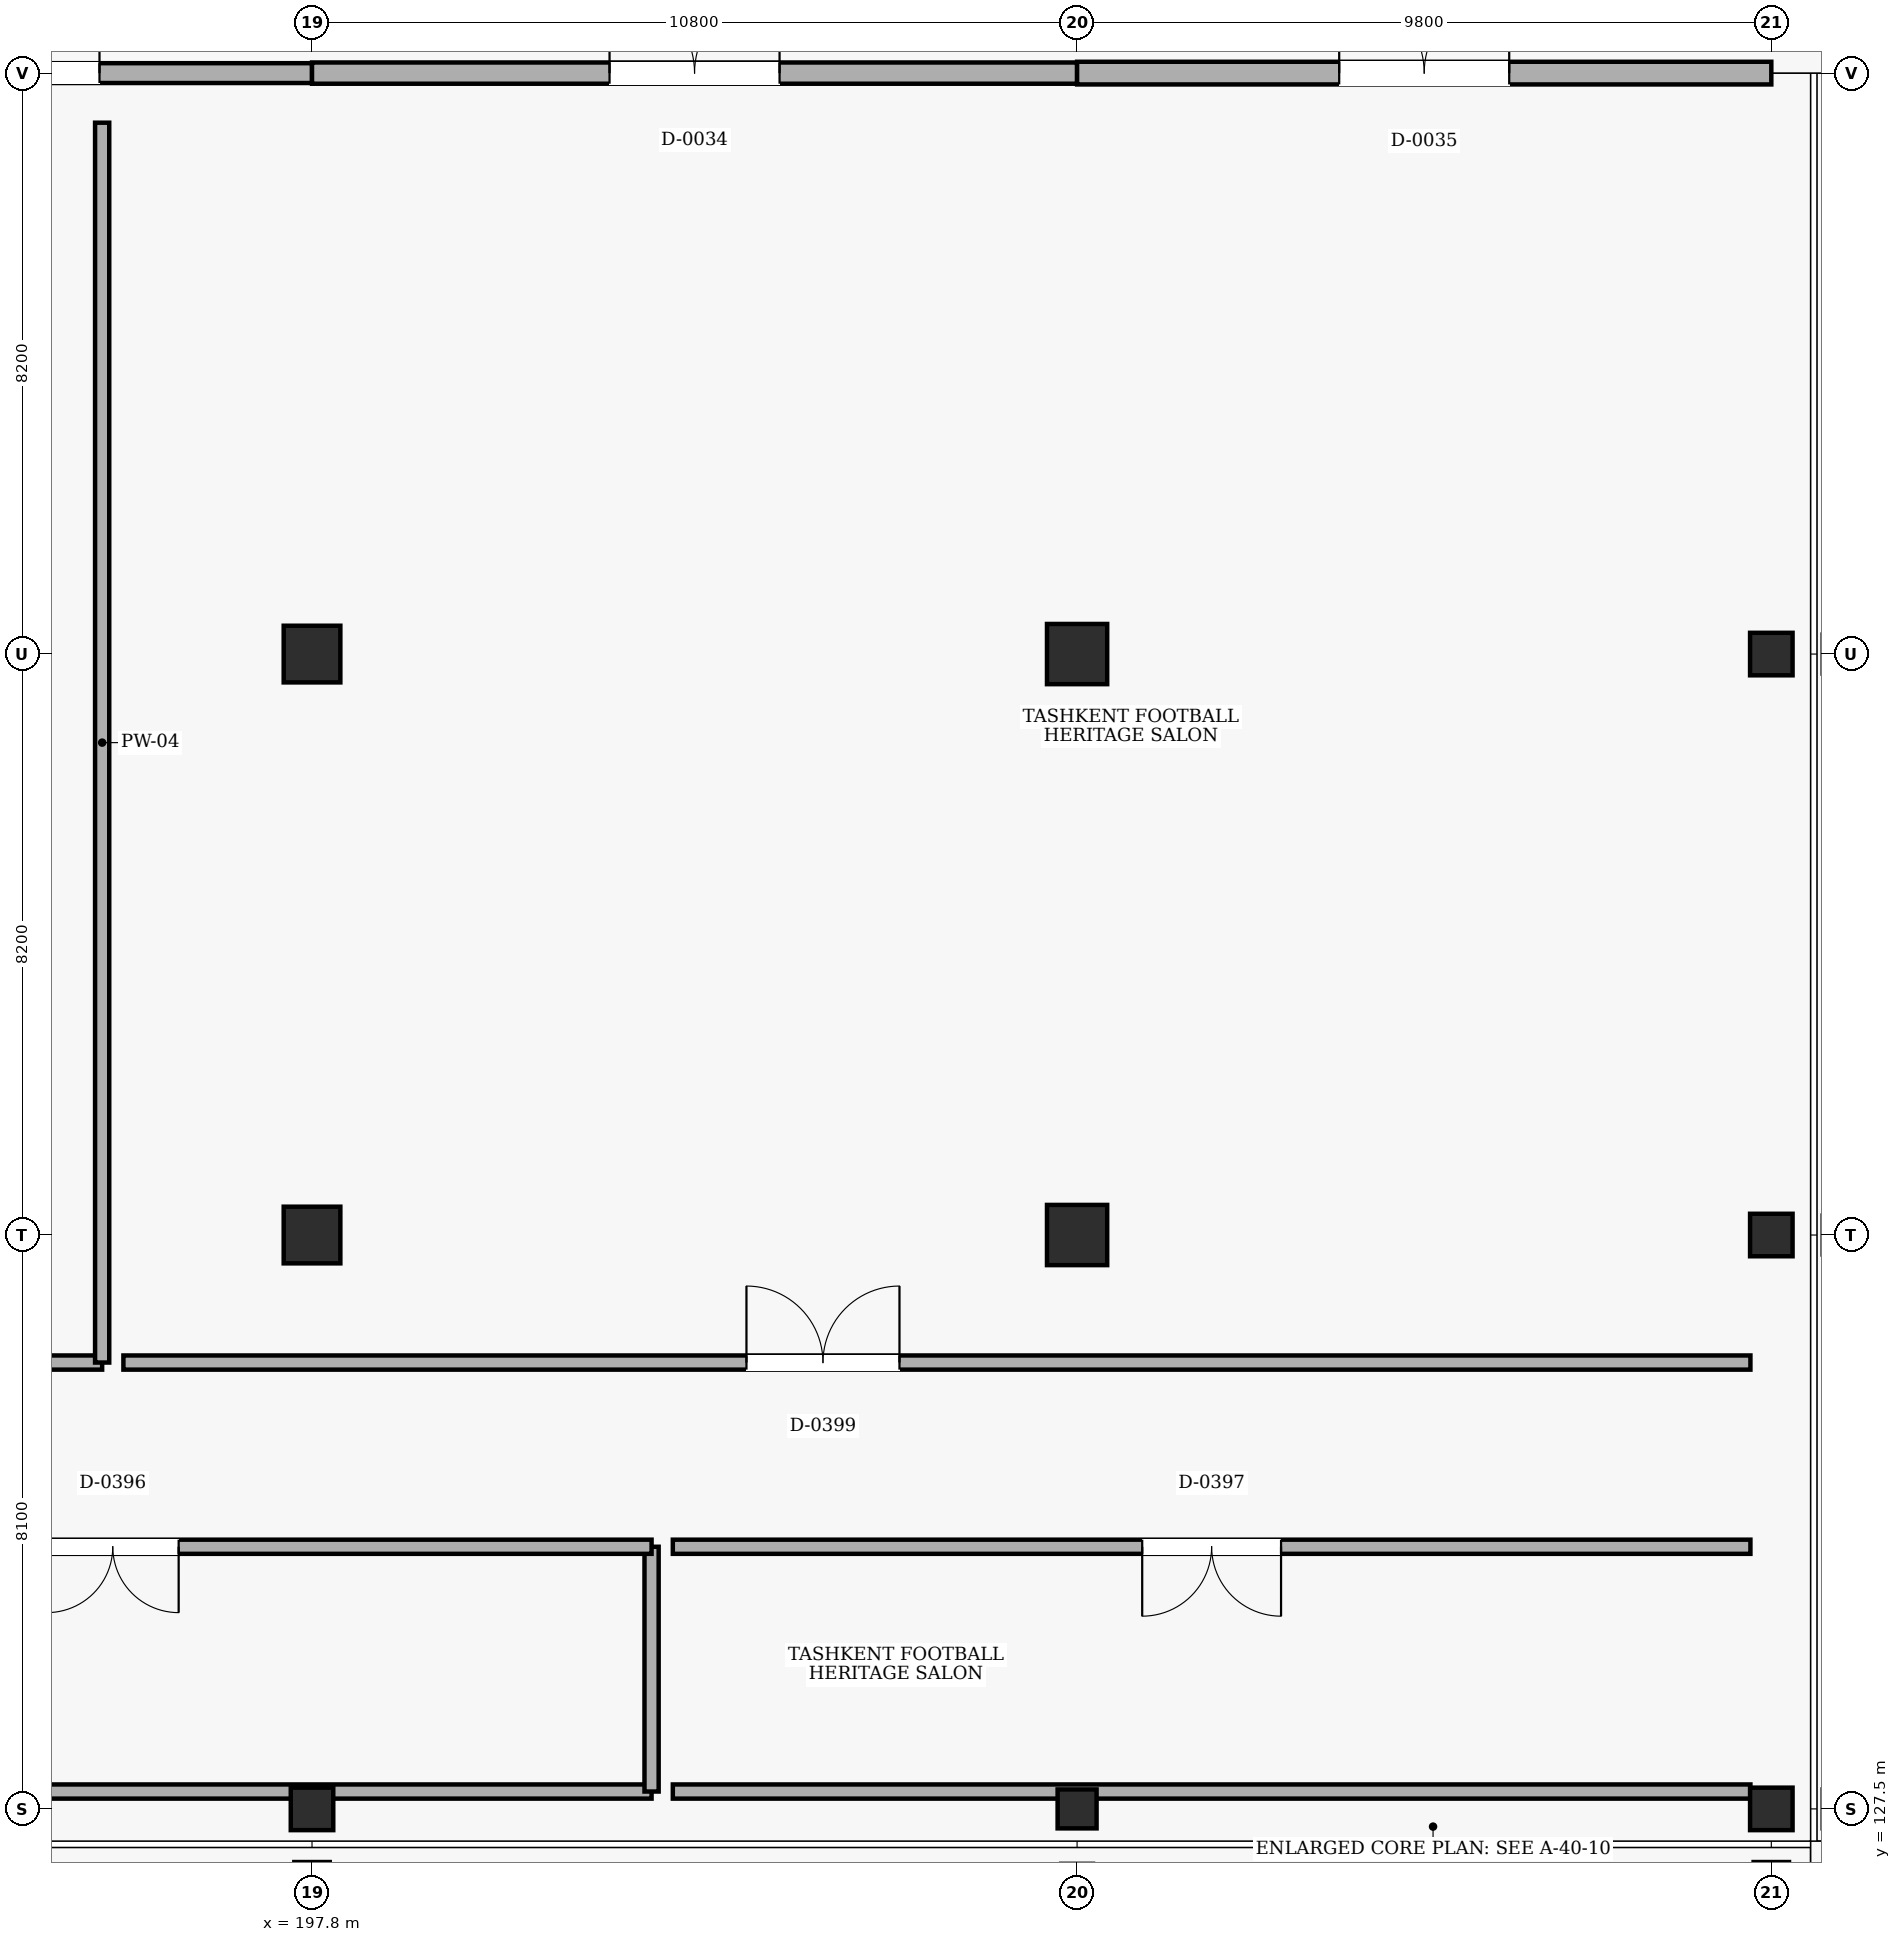
"""IFC4 building model, lengths in metres.
Left out: names, types, materials, properties, quantities, classifications, styles, units other than length and angle.
Written with IfcOpenShell. Run it as: python <this file> out.ifc"""

import sys

from ifc_helpers import new_model, si_unit, direction, frame, frame_2d, origin, origin_2d, place, context, subcontext, project, spatial, rectangle, extrude, element, fill, save


model = new_model("IFC4")
c1 = context("Model", 3, precision=1e-05, world=origin(), true_north=direction((0.0, 1.0)))
c2 = subcontext(c1, "Body", "Model", "MODEL_VIEW")
j1 = project(units=[si_unit("LENGTHUNIT", "METRE"), si_unit("PLANEANGLEUNIT", "RADIAN")], contexts=[c1])
p1 = place(None, origin())
s1 = spatial("IfcSite", under=j1, at=p1, CompositionType="ELEMENT")
p2 = place(p1, origin())
s2 = spatial("IfcBuilding", under=s1, at=p2, CompositionType="ELEMENT")
p3 = place(p2, origin())
s3 = spatial("IfcBuildingStorey", under=s2, at=p3, CompositionType="ELEMENT", Elevation=0.0)
p4 = place(p3, frame((197.8, 126.5, 0.0), z_axis=(0.0, 0.0, 1.0), x_axis=(1.0, 0.0, 0.0)))
e1 = element("IfcColumn", 1, at=p4, inside=s3, PredefinedType="COLUMN", context=c2, shape_type="SweptSolid", body=[
    extrude(rectangle(XDim=0.5, YDim=0.5, at=origin_2d()), origin(), (0.0, 0.0, 1.0), 5.4),
])
p5 = place(p3, frame((197.8, 127.5, 0.0), z_axis=(0.0, 0.0, 1.0), x_axis=(1.0, 0.0, 0.0)))
e2 = element("IfcColumn", 2, at=p5, inside=s3, PredefinedType="COLUMN", context=c2, shape_type="SweptSolid", body=[
    extrude(rectangle(XDim=0.6, YDim=0.6, at=origin_2d()), origin(), (0.0, 0.0, 1.0), 5.4),
])
for number, where, z_axis, x_axis in (
    (3, (197.8, 135.6, 0.0), (0.0, 0.0, 1.0), (1.0, 0.0, 0.0)),
    (4, (197.8, 143.8, 0.0), (0.0, 0.0, 1.0), (1.0, 0.0, 0.0)),
):
    element("IfcColumn", number, at=place(p3, frame(where, z_axis=z_axis, x_axis=x_axis)), inside=s3, PredefinedType="COLUMN", context=c2, shape_type="SweptSolid", body=[
        extrude(rectangle(XDim=0.8, YDim=0.8, at=origin_2d()), origin(), (0.0, 0.0, 1.0), 5.4),
    ])
p6 = place(p3, frame((208.6, 127.5, 0.0), z_axis=(0.0, 0.0, 1.0), x_axis=(1.0, 0.0, 0.0)))
e5 = element("IfcColumn", 5, at=p6, inside=s3, PredefinedType="COLUMN", context=c2, shape_type="SweptSolid", body=[
    extrude(rectangle(XDim=0.55, YDim=0.55, at=origin_2d()), origin(), (0.0, 0.0, 1.0), 5.4),
])
for number, where, z_axis, x_axis in (
    (6, (208.6, 135.6, 0.0), (0.0, 0.0, 1.0), (1.0, 0.0, 0.0)),
    (7, (208.6, 143.8, 0.0), (0.0, 0.0, 1.0), (1.0, 0.0, 0.0)),
):
    element("IfcColumn", number, at=place(p3, frame(where, z_axis=z_axis, x_axis=x_axis)), inside=s3, PredefinedType="COLUMN", context=c2, shape_type="SweptSolid", body=[
        extrude(rectangle(XDim=0.85, YDim=0.85, at=origin_2d()), origin(), (0.0, 0.0, 1.0), 5.4),
    ])
p7 = place(p3, frame((218.4, 126.5, 0.0), z_axis=(0.0, 0.0, 1.0), x_axis=(1.0, 0.0, 0.0)))
e8 = element("IfcColumn", 8, at=p7, inside=s3, PredefinedType="COLUMN", context=c2, shape_type="SweptSolid", body=[
    extrude(rectangle(XDim=0.5, YDim=0.5, at=origin_2d()), origin(), (0.0, 0.0, 1.0), 5.4),
])
for number, where, z_axis, x_axis in (
    (9, (218.4, 127.5, 0.0), (0.0, 0.0, 1.0), (1.0, 0.0, 0.0)),
    (10, (218.4, 135.6, 0.0), (0.0, 0.0, 1.0), (1.0, 0.0, 0.0)),
    (11, (218.4, 143.8, 0.0), (0.0, 0.0, 1.0), (1.0, 0.0, 0.0)),
):
    element("IfcColumn", number, at=place(p3, frame(where, z_axis=z_axis, x_axis=x_axis)), inside=s3, PredefinedType="COLUMN", context=c2, shape_type="SweptSolid", body=[
        extrude(rectangle(XDim=0.6, YDim=0.6, at=origin_2d()), origin(), (0.0, 0.0, 1.0), 5.4),
    ])
p8 = place(p3, frame((189.4, 152.0, 0.0), z_axis=(0.0, 0.0, 1.0), x_axis=(1.0, 0.0, 0.0)))
e12 = element("IfcWall", 12, at=p8, inside=s3, PredefinedType="SOLIDWALL", context=c2, shape_type="SweptSolid", body=[
    extrude(rectangle(XDim=8.4, YDim=0.28, at=frame_2d((4.2, 0.0))), origin(), (0.0, 0.0, 1.0), 5.08),
])
p9 = place(p8, frame((3.0, 0.0, 0.0)))
e13 = element("IfcOpeningElement", 13, at=p9, cuts=e12, PredefinedType="OPENING", context=c2, shape_type="SweptSolid", body=[
    extrude(rectangle(XDim=2.4, YDim=2.2, at=frame_2d((1.2, 1.1))), frame((0.0, 0.15, 0.0), z_axis=(0.0, -1.0, 0.0), x_axis=(1.0, 0.0, 0.0)), (0.0, 0.0, 1.0), 0.3),
])
p10 = place(p3, frame((197.8, 152.0, 0.0), z_axis=(0.0, 0.0, 1.0), x_axis=(1.0, 0.0, 0.0)))
e14 = element("IfcWall", 14, at=p10, inside=s3, PredefinedType="SOLIDWALL", context=c2, shape_type="SweptSolid", body=[
    extrude(rectangle(XDim=10.8, YDim=0.3, at=frame_2d((5.4, 0.0))), origin(), (0.0, 0.0, 1.0), 5.08),
])
p11 = place(p10, frame((4.2, 0.0, 0.0)))
e15 = element("IfcOpeningElement", 15, at=p11, cuts=e14, PredefinedType="OPENING", context=c2, shape_type="SweptSolid", body=[
    extrude(rectangle(XDim=2.4, YDim=2.2, at=frame_2d((1.2, 1.1))), frame((0.0, 0.16, 0.0), z_axis=(0.0, -1.0, 0.0), x_axis=(1.0, 0.0, 0.0)), (0.0, 0.0, 1.0), 0.32),
])
p12 = place(p3, frame((208.6, 152.0, 0.0), z_axis=(0.0, 0.0, 1.0), x_axis=(1.0, 0.0, 0.0)))
e16 = element("IfcWall", 16, at=p12, inside=s3, PredefinedType="SOLIDWALL", context=c2, shape_type="SweptSolid", body=[
    extrude(rectangle(XDim=9.8, YDim=0.32, at=frame_2d((4.9, 0.0))), origin(), (0.0, 0.0, 1.0), 5.08),
])
p13 = place(p12, frame((3.7, 0.0, 0.0)))
e17 = element("IfcOpeningElement", 17, at=p13, cuts=e16, PredefinedType="OPENING", context=c2, shape_type="SweptSolid", body=[
    extrude(rectangle(XDim=2.4, YDim=2.2, at=frame_2d((1.2, 1.1))), frame((0.0, 0.17, 0.0), z_axis=(0.0, -1.0, 0.0), x_axis=(1.0, 0.0, 0.0)), (0.0, 0.0, 1.0), 0.34),
])
p14 = place(p3, frame((187.382, 127.745, 0.0), z_axis=(0.0, 0.0, 1.0), x_axis=(1.0, 0.0, 0.0)))
e18 = element("IfcWall", 18, at=p14, inside=s3, PredefinedType="PARTITIONING", context=c2, shape_type="SweptSolid", body=[
    extrude(rectangle(XDim=15.212, YDim=0.2, at=frame_2d((7.606, 0.0))), origin(), (0.0, 0.0, 1.0), 4.26),
])
p15 = place(p3, frame((202.593, 127.745, 0.0), z_axis=(0.0, 0.0, 1.0), x_axis=(0.0, 1.0, 0.0)))
e19 = element("IfcWall", 19, at=p15, inside=s3, PredefinedType="PARTITIONING", context=c2, shape_type="SweptSolid", body=[
    extrude(rectangle(XDim=3.455, YDim=0.2, at=frame_2d((1.728, 0.0))), origin(), (0.0, 0.0, 1.0), 5.08),
])
p16 = place(p3, frame((202.593, 131.2, 0.0), z_axis=(0.0, 0.0, 1.0), x_axis=(-1.0, 0.0, 0.0)))
e20 = element("IfcWall", 20, at=p16, inside=s3, PredefinedType="PARTITIONING", context=c2, shape_type="SweptSolid", body=[
    extrude(rectangle(XDim=15.212, YDim=0.2, at=frame_2d((7.606, 0.0))), origin(), (0.0, 0.0, 1.0), 5.08),
])
p17 = place(p16, frame((6.676, 0.0, 0.0)))
e21 = element("IfcOpeningElement", 21, at=p17, cuts=e20, PredefinedType="OPENING", context=c2, shape_type="SweptSolid", body=[
    extrude(rectangle(XDim=1.86, YDim=2.3, at=frame_2d((0.93, 1.15))), frame((0.0, 0.11, 0.0), z_axis=(0.0, -1.0, 0.0), x_axis=(1.0, 0.0, 0.0)), (0.0, 0.0, 1.0), 0.22),
])
p18 = place(p3, frame((202.893, 127.745, 0.0), z_axis=(0.0, 0.0, 1.0), x_axis=(1.0, 0.0, 0.0)))
e22 = element("IfcWall", 22, at=p18, inside=s3, PredefinedType="PARTITIONING", context=c2, shape_type="SweptSolid", body=[
    extrude(rectangle(XDim=15.212, YDim=0.2, at=frame_2d((7.606, 0.0))), origin(), (0.0, 0.0, 1.0), 4.21),
])
p19 = place(p3, frame((218.105, 131.2, 0.0), z_axis=(0.0, 0.0, 1.0), x_axis=(-1.0, 0.0, 0.0)))
e23 = element("IfcWall", 23, at=p19, inside=s3, PredefinedType="PARTITIONING", context=c2, shape_type="SweptSolid", body=[
    extrude(rectangle(XDim=15.212, YDim=0.2, at=frame_2d((7.606, 0.0))), origin(), (0.0, 0.0, 1.0), 5.08),
])
p20 = place(p19, frame((6.626, 0.0, 0.0)))
e24 = element("IfcOpeningElement", 24, at=p20, cuts=e23, PredefinedType="OPENING", context=c2, shape_type="SweptSolid", body=[
    extrude(rectangle(XDim=1.96, YDim=2.3, at=frame_2d((0.98, 1.15))), frame((0.0, 0.11, 0.0), z_axis=(0.0, -1.0, 0.0), x_axis=(1.0, 0.0, 0.0)), (0.0, 0.0, 1.0), 0.22),
])
p21 = place(p3, frame((188.68, 133.8, 0.0), z_axis=(0.0, 0.0, 1.0), x_axis=(1.0, 0.0, 0.0)))
e25 = element("IfcWall", 25, at=p21, inside=s3, PredefinedType="PARTITIONING", context=c2, shape_type="SweptSolid", body=[
    extrude(rectangle(XDim=6.157, YDim=0.2, at=frame_2d((3.079, 0.0))), origin(), (0.0, 0.0, 1.0), 5.08),
])
p22 = place(p21, frame((2.039, 0.0, 0.0)))
e26 = element("IfcOpeningElement", 26, at=p22, cuts=e25, PredefinedType="OPENING", context=c2, shape_type="SweptSolid", body=[
    extrude(rectangle(XDim=2.08, YDim=2.35, at=frame_2d((1.04, 1.175))), frame((0.0, 0.11, 0.0), z_axis=(0.0, -1.0, 0.0), x_axis=(1.0, 0.0, 0.0)), (0.0, 0.0, 1.0), 0.22),
])
p23 = place(p3, frame((194.837, 133.8, 0.0), z_axis=(0.0, 0.0, 1.0), x_axis=(0.0, 1.0, 0.0)))
e27 = element("IfcWall", 27, at=p23, inside=s3, PredefinedType="PARTITIONING", context=c2, shape_type="SweptSolid", body=[
    extrude(rectangle(XDim=17.5, YDim=0.2, at=frame_2d((8.75, 0.0))), origin(), (0.0, 0.0, 1.0), 5.08),
])
p24 = place(p3, frame((195.137, 133.8, 0.0), z_axis=(0.0, 0.0, 1.0), x_axis=(1.0, 0.0, 0.0)))
e28 = element("IfcWall", 28, at=p24, inside=s3, PredefinedType="PARTITIONING", context=c2, shape_type="SweptSolid", body=[
    extrude(rectangle(XDim=22.968, YDim=0.2, at=frame_2d((11.484, 0.0))), origin(), (0.0, 0.0, 1.0), 5.08),
])
p25 = place(p24, frame((8.795, 0.0, 0.0)))
e29 = element("IfcOpeningElement", 29, at=p25, cuts=e28, PredefinedType="OPENING", context=c2, shape_type="SweptSolid", body=[
    extrude(rectangle(XDim=2.16, YDim=2.35, at=frame_2d((1.08, 1.175))), frame((0.0, 0.11, 0.0), z_axis=(0.0, -1.0, 0.0), x_axis=(1.0, 0.0, 0.0)), (0.0, 0.0, 1.0), 0.22),
])
p26 = place(p9, origin())
e30 = element("IfcDoor", 30, at=p26, inside=s3, OperationType="DOUBLE_DOOR_SINGLE_SWING", PredefinedType="DOOR", context=c2, shape_type="SweptSolid", body=[
    extrude(rectangle(XDim=2.4, YDim=2.2, at=frame_2d((1.2, 1.1))), frame((0.0, 0.025, 0.0), z_axis=(0.0, -1.0, 0.0), x_axis=(1.0, 0.0, 0.0)), (0.0, 0.0, 1.0), 0.05),
])
fill(e13, e30)
p27 = place(p11, origin())
e31 = element("IfcDoor", 31, at=p27, inside=s3, OperationType="DOUBLE_DOOR_SINGLE_SWING", PredefinedType="DOOR", context=c2, shape_type="SweptSolid", body=[
    extrude(rectangle(XDim=2.4, YDim=2.2, at=frame_2d((1.2, 1.1))), frame((0.0, 0.025, 0.0), z_axis=(0.0, -1.0, 0.0), x_axis=(1.0, 0.0, 0.0)), (0.0, 0.0, 1.0), 0.05),
])
fill(e15, e31)
p28 = place(p13, origin())
e32 = element("IfcDoor", 32, at=p28, inside=s3, OperationType="DOUBLE_DOOR_SINGLE_SWING", PredefinedType="DOOR", context=c2, shape_type="SweptSolid", body=[
    extrude(rectangle(XDim=2.4, YDim=2.2, at=frame_2d((1.2, 1.1))), frame((0.0, 0.025, 0.0), z_axis=(0.0, -1.0, 0.0), x_axis=(1.0, 0.0, 0.0)), (0.0, 0.0, 1.0), 0.05),
])
fill(e17, e32)
p29 = place(p17, origin())
e33 = element("IfcDoor", 33, at=p29, inside=s3, OperationType="DOUBLE_DOOR_SINGLE_SWING", PredefinedType="DOOR", context=c2, shape_type="SweptSolid", body=[
    extrude(rectangle(XDim=1.86, YDim=2.3, at=frame_2d((0.93, 1.15))), frame((0.0, 0.025, 0.0), z_axis=(0.0, -1.0, 0.0), x_axis=(1.0, 0.0, 0.0)), (0.0, 0.0, 1.0), 0.05),
])
fill(e21, e33)
p30 = place(p20, origin())
e34 = element("IfcDoor", 34, at=p30, inside=s3, OperationType="DOUBLE_DOOR_SINGLE_SWING", PredefinedType="DOOR", context=c2, shape_type="SweptSolid", body=[
    extrude(rectangle(XDim=1.96, YDim=2.3, at=frame_2d((0.98, 1.15))), frame((0.0, 0.025, 0.0), z_axis=(0.0, -1.0, 0.0), x_axis=(1.0, 0.0, 0.0)), (0.0, 0.0, 1.0), 0.05),
])
fill(e24, e34)
p31 = place(p25, origin())
e35 = element("IfcDoor", 35, at=p31, inside=s3, OperationType="DOUBLE_DOOR_SINGLE_SWING", PredefinedType="DOOR", context=c2, shape_type="SweptSolid", body=[
    extrude(rectangle(XDim=2.16, YDim=2.35, at=frame_2d((1.08, 1.175))), frame((0.0, 0.025, 0.0), z_axis=(0.0, -1.0, 0.0), x_axis=(1.0, 0.0, 0.0)), (0.0, 0.0, 1.0), 0.05),
])
fill(e29, e35)
save(model, sys.argv[1])
